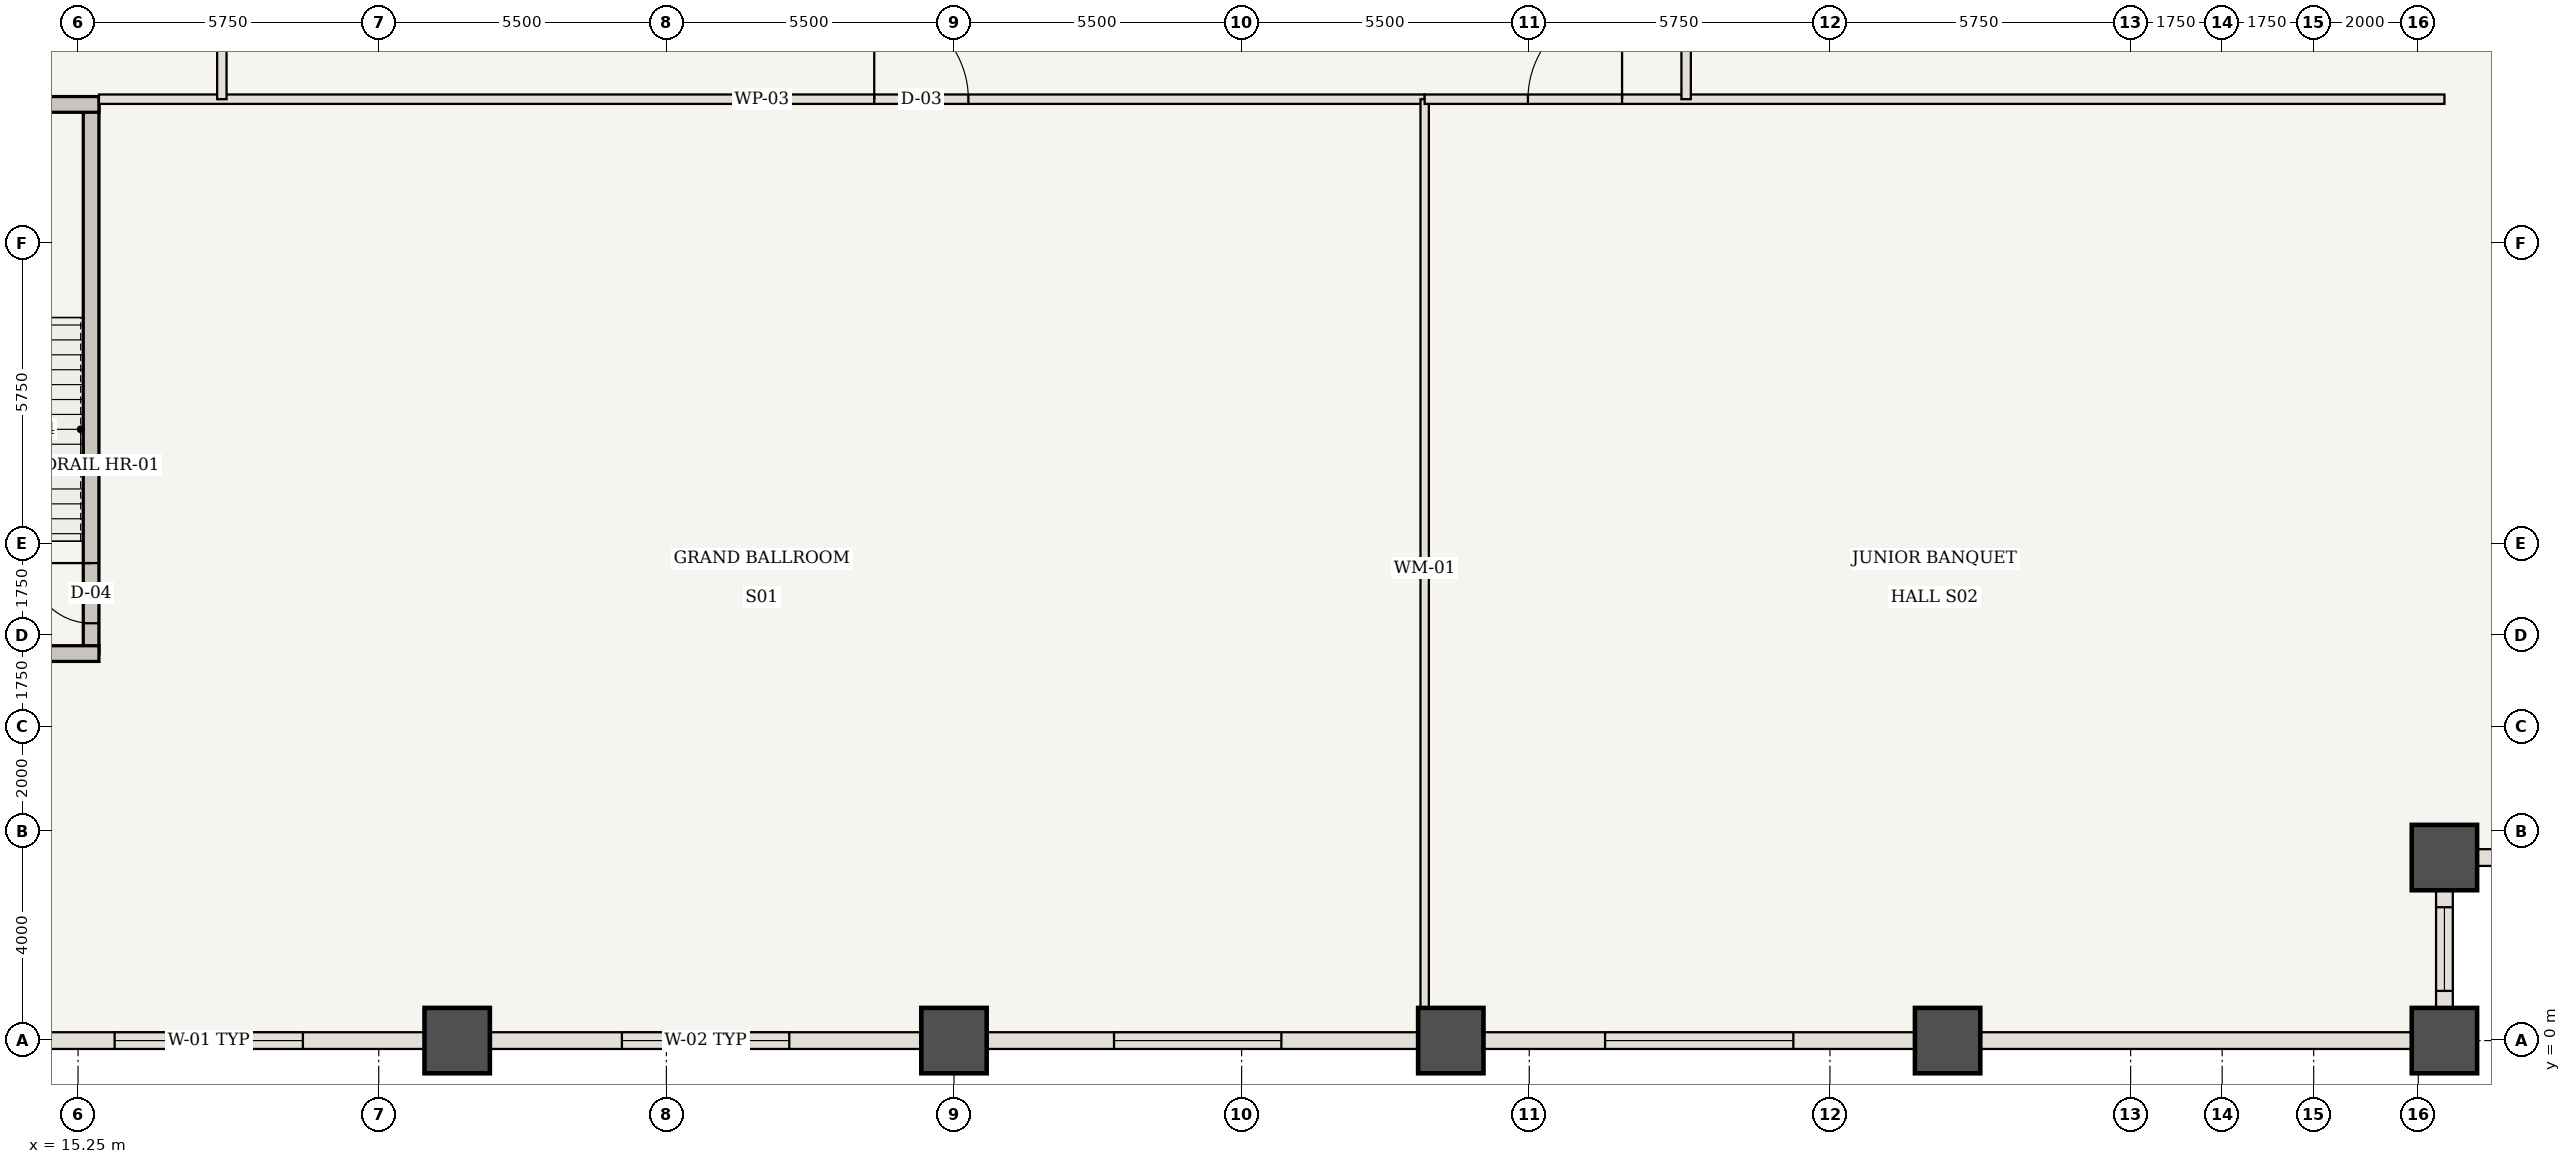
"""IFC4 building model, lengths in metres.
Left out: names, types, materials, properties, quantities, classifications, styles, units other than length and angle.
Written with IfcOpenShell. Run it as: python <this file> out.ifc"""

import sys

from ifc_helpers import new_model, si_unit, direction, frame, frame_2d, origin, origin_2d, place, context, subcontext, project, spatial, rectangle, extrude, element, fill, save


model = new_model("IFC4")
c1 = context("Model", 3, precision=1e-05, world=origin(), true_north=direction((0.0, 1.0)))
c2 = subcontext(c1, "Body", "Model", "MODEL_VIEW")
j1 = project(units=[si_unit("LENGTHUNIT", "METRE"), si_unit("PLANEANGLEUNIT", "RADIAN")], contexts=[c1])
p1 = place(None, origin())
s1 = spatial("IfcSite", under=j1, at=p1, CompositionType="ELEMENT")
p2 = place(p1, origin())
s2 = spatial("IfcBuilding", under=s1, at=p2, CompositionType="ELEMENT")
p3 = place(p2, frame((0.0, 0.0, 23.8)))
s3 = spatial("IfcBuildingStorey", under=s2, at=p3, CompositionType="ELEMENT", Elevation=23.8)
for number, where, z_axis, x_axis in (
    (1, (60.5, 0.0, 0.0), (0.0, 0.0, 1.0), (1.0, 0.0, 0.0)),
    (2, (60.5, 3.5, 0.0), (0.0, 0.0, 1.0), (1.0, 0.0, 0.0)),
    (3, (22.5, 0.0, 0.0), (0.0, 0.0, 1.0), (1.0, 0.0, 0.0)),
    (4, (32.0, 0.0, 0.0), (0.0, 0.0, 1.0), (1.0, 0.0, 0.0)),
    (5, (41.5, 0.0, 0.0), (0.0, 0.0, 1.0), (1.0, 0.0, 0.0)),
    (6, (51.0, 0.0, 0.0), (0.0, 0.0, 1.0), (1.0, 0.0, 0.0)),
):
    element("IfcColumn", number, at=place(p3, frame(where, z_axis=z_axis, x_axis=x_axis)), inside=s3, PredefinedType="COLUMN", context=c2, shape_type="SweptSolid", body=[
        extrude(rectangle(XDim=1.25, YDim=1.25, at=origin_2d()), origin(), (0.0, 0.0, 1.0), 5.6),
    ])
p4 = place(p3, frame((15.5, 7.4, 0.0), z_axis=(0.0, 0.0, 1.0), x_axis=(0.0, 1.0, 0.0)))
e7 = element("IfcWall", 7, at=p4, inside=s3, PredefinedType="SHEAR", context=c2, shape_type="SweptSolid", body=[
    extrude(rectangle(XDim=10.5, YDim=0.3, at=frame_2d((5.25, 0.0))), origin(), (0.0, 0.0, 1.0), 5.18),
])
p5 = place(p4, frame((0.58, 0.0, 0.0)))
e8 = element("IfcOpeningElement", 8, at=p5, cuts=e7, PredefinedType="OPENING", context=c2, shape_type="SweptSolid", body=[
    extrude(rectangle(XDim=1.15, YDim=2.15, at=frame_2d((0.575, 1.075))), frame((0.0, 0.16, 0.0), z_axis=(0.0, -1.0, 0.0), x_axis=(1.0, 0.0, 0.0)), (0.0, 0.0, 1.0), 0.32),
])
for number, where, z_axis, x_axis in (
    (9, (10.9, 7.4, 0.0), (0.0, 0.0, 1.0), (1.0, 0.0, 0.0)),
    (10, (10.9, 17.9, 0.0), (0.0, 0.0, 1.0), (1.0, 0.0, 0.0)),
):
    element("IfcWall", number, at=place(p3, frame(where, z_axis=z_axis, x_axis=x_axis)), inside=s3, PredefinedType="SHEAR", context=c2, shape_type="SweptSolid", body=[
        extrude(rectangle(XDim=4.75, YDim=0.3, at=frame_2d((2.375, 0.0))), origin(), (0.0, 0.0, 1.0), 5.18),
    ])
p6 = place(p3, frame((15.65, 18.0, 0.0), z_axis=(0.0, 0.0, 1.0), x_axis=(1.0, 0.0, 0.0)))
e11 = element("IfcWall", 11, at=p6, inside=s3, PredefinedType="STANDARD", context=c2, shape_type="SweptSolid", body=[
    extrude(rectangle(XDim=25.35, YDim=0.18, at=frame_2d((12.675, 0.0))), origin(), (0.0, 0.0, 1.0), 5.18),
])
p7 = place(p6, frame((14.825, 0.0, 0.0)))
e12 = element("IfcOpeningElement", 12, at=p7, cuts=e11, PredefinedType="OPENING", context=c2, shape_type="SweptSolid", body=[
    extrude(rectangle(XDim=1.8, YDim=2.35, at=frame_2d((0.9, 1.175))), frame((0.0, 0.1, 0.0), z_axis=(0.0, -1.0, 0.0), x_axis=(1.0, 0.0, 0.0)), (0.0, 0.0, 1.0), 0.2),
])
p8 = place(p3, frame((41.0, 0.06, 0.0), z_axis=(0.0, 0.0, 1.0), x_axis=(0.0, 1.0, 0.0)))
e13 = element("IfcWall", 13, at=p8, inside=s3, PredefinedType="MOVABLE", context=c2, shape_type="SweptSolid", body=[
    extrude(rectangle(XDim=17.94, YDim=0.16, at=frame_2d((8.97, 0.0))), origin(), (0.0, 0.0, 1.0), 5.18),
])
p9 = place(p3, frame((41.0, 18.0, 0.0), z_axis=(0.0, 0.0, 1.0), x_axis=(1.0, 0.0, 0.0)))
e14 = element("IfcWall", 14, at=p9, inside=s3, PredefinedType="STANDARD", context=c2, shape_type="SweptSolid", body=[
    extrude(rectangle(XDim=19.5, YDim=0.18, at=frame_2d((9.75, 0.0))), origin(), (0.0, 0.0, 1.0), 5.18),
])
p10 = place(p9, frame((1.975, 0.0, 0.0)))
e15 = element("IfcOpeningElement", 15, at=p10, cuts=e14, PredefinedType="OPENING", context=c2, shape_type="SweptSolid", body=[
    extrude(rectangle(XDim=1.8, YDim=2.35, at=frame_2d((0.9, 1.175))), frame((0.0, 0.1, 0.0), z_axis=(0.0, -1.0, 0.0), x_axis=(1.0, 0.0, 0.0)), (0.0, 0.0, 1.0), 0.2),
])
p11 = place(p3, frame((18.0, 18.0, 0.0), z_axis=(0.0, 0.0, 1.0), x_axis=(0.0, 1.0, 0.0)))
e16 = element("IfcWall", 16, at=p11, inside=s3, PredefinedType="STANDARD", context=c2, shape_type="SweptSolid", body=[
    extrude(rectangle(XDim=13.2, YDim=0.18, at=frame_2d((6.6, 0.0))), origin(), (0.0, 0.0, 1.0), 5.18),
])
p12 = place(p11, frame((6.1, 0.0, 0.0)))
e17 = element("IfcOpeningElement", 17, at=p12, cuts=e16, PredefinedType="OPENING", context=c2, shape_type="SweptSolid", body=[
    extrude(rectangle(XDim=0.95, YDim=2.15, at=frame_2d((0.475, 1.075))), frame((0.0, 0.1, 0.0), z_axis=(0.0, -1.0, 0.0), x_axis=(1.0, 0.0, 0.0)), (0.0, 0.0, 1.0), 0.2),
])
p13 = place(p3, frame((46.0, 18.0, 0.0), z_axis=(0.0, 0.0, 1.0), x_axis=(0.0, 1.0, 0.0)))
e18 = element("IfcWall", 18, at=p13, inside=s3, PredefinedType="STANDARD", context=c2, shape_type="SweptSolid", body=[
    extrude(rectangle(XDim=14.8, YDim=0.18, at=frame_2d((7.4, 0.0))), origin(), (0.0, 0.0, 1.0), 5.18),
])
p14 = place(p13, frame((6.9, 0.0, 0.0)))
e19 = element("IfcOpeningElement", 19, at=p14, cuts=e18, PredefinedType="OPENING", context=c2, shape_type="SweptSolid", body=[
    extrude(rectangle(XDim=0.95, YDim=2.15, at=frame_2d((0.475, 1.075))), frame((0.0, 0.1, 0.0), z_axis=(0.0, -1.0, 0.0), x_axis=(1.0, 0.0, 0.0)), (0.0, 0.0, 1.0), 0.2),
])
p15 = place(p3, frame((22.5, 0.0, 0.0), z_axis=(0.0, 0.0, 1.0), x_axis=(-1.0, 0.0, 0.0)))
e20 = element("IfcWall", 20, at=p15, inside=s3, PredefinedType="USERDEFINED", context=c2, shape_type="SweptSolid", body=[
    extrude(rectangle(XDim=9.5, YDim=0.32, at=frame_2d((4.75, 0.0))), origin(), (0.0, 0.0, 1.0), 4.28),
])
p16 = place(p15, frame((2.95, 0.0, 0.85)))
e21 = element("IfcOpeningElement", 21, at=p16, cuts=e20, PredefinedType="OPENING", context=c2, shape_type="SweptSolid", body=[
    extrude(rectangle(XDim=3.6, YDim=2.6, at=frame_2d((1.8, 1.3))), frame((0.0, 0.17, 0.0), z_axis=(0.0, -1.0, 0.0), x_axis=(1.0, 0.0, 0.0)), (0.0, 0.0, 1.0), 0.34),
])
p17 = place(p3, frame((32.0, 0.0, 0.0), z_axis=(0.0, 0.0, 1.0), x_axis=(-1.0, 0.0, 0.0)))
e22 = element("IfcWall", 22, at=p17, inside=s3, PredefinedType="USERDEFINED", context=c2, shape_type="SweptSolid", body=[
    extrude(rectangle(XDim=9.5, YDim=0.32, at=frame_2d((4.75, 0.0))), origin(), (0.0, 0.0, 1.0), 4.28),
])
p18 = place(p17, frame((3.15, 0.0, 0.85)))
e23 = element("IfcOpeningElement", 23, at=p18, cuts=e22, PredefinedType="OPENING", context=c2, shape_type="SweptSolid", body=[
    extrude(rectangle(XDim=3.2, YDim=2.4, at=frame_2d((1.6, 1.2))), frame((0.0, 0.17, 0.0), z_axis=(0.0, -1.0, 0.0), x_axis=(1.0, 0.0, 0.0)), (0.0, 0.0, 1.0), 0.34),
])
p19 = place(p3, frame((41.5, 0.0, 0.0), z_axis=(0.0, 0.0, 1.0), x_axis=(-1.0, 0.0, 0.0)))
e24 = element("IfcWall", 24, at=p19, inside=s3, PredefinedType="USERDEFINED", context=c2, shape_type="SweptSolid", body=[
    extrude(rectangle(XDim=9.5, YDim=0.32, at=frame_2d((4.75, 0.0))), origin(), (0.0, 0.0, 1.0), 4.28),
])
p20 = place(p19, frame((3.24, 0.0, 0.85)))
e25 = element("IfcOpeningElement", 25, at=p20, cuts=e24, PredefinedType="OPENING", context=c2, shape_type="SweptSolid", body=[
    extrude(rectangle(XDim=3.2, YDim=2.4, at=frame_2d((1.6, 1.2))), frame((0.0, 0.17, 0.0), z_axis=(0.0, -1.0, 0.0), x_axis=(1.0, 0.0, 0.0)), (0.0, 0.0, 1.0), 0.34),
])
p21 = place(p3, frame((51.0, 0.0, 0.0), z_axis=(0.0, 0.0, 1.0), x_axis=(-1.0, 0.0, 0.0)))
e26 = element("IfcWall", 26, at=p21, inside=s3, PredefinedType="USERDEFINED", context=c2, shape_type="SweptSolid", body=[
    extrude(rectangle(XDim=9.5, YDim=0.32, at=frame_2d((4.75, 0.0))), origin(), (0.0, 0.0, 1.0), 4.28),
])
p22 = place(p21, frame((2.95, 0.0, 0.85)))
e27 = element("IfcOpeningElement", 27, at=p22, cuts=e26, PredefinedType="OPENING", context=c2, shape_type="SweptSolid", body=[
    extrude(rectangle(XDim=3.6, YDim=2.6, at=frame_2d((1.8, 1.3))), frame((0.0, 0.17, 0.0), z_axis=(0.0, -1.0, 0.0), x_axis=(1.0, 0.0, 0.0)), (0.0, 0.0, 1.0), 0.34),
])
p23 = place(p3, frame((60.5, 0.0, 0.0), z_axis=(0.0, 0.0, 1.0), x_axis=(-1.0, 0.0, 0.0)))
e28 = element("IfcWall", 28, at=p23, inside=s3, PredefinedType="USERDEFINED", context=c2, shape_type="SweptSolid", body=[
    extrude(rectangle(XDim=9.5, YDim=0.32, at=frame_2d((4.75, 0.0))), origin(), (0.0, 0.0, 1.0), 4.28),
])
p24 = place(p3, frame((60.5, 3.5, 0.0), z_axis=(0.0, 0.0, 1.0), x_axis=(0.0, -1.0, 0.0)))
e29 = element("IfcWall", 29, at=p24, inside=s3, PredefinedType="USERDEFINED", context=c2, shape_type="SweptSolid", body=[
    extrude(rectangle(XDim=3.5, YDim=0.32, at=frame_2d((1.75, 0.0))), origin(), (0.0, 0.0, 1.0), 4.28),
])
p25 = place(p24, frame((0.95, 0.0, 0.85)))
e30 = element("IfcOpeningElement", 30, at=p25, cuts=e29, PredefinedType="OPENING", context=c2, shape_type="SweptSolid", body=[
    extrude(rectangle(XDim=1.6, YDim=2.05, at=frame_2d((0.8, 1.025))), frame((0.0, 0.17, 0.0), z_axis=(0.0, -1.0, 0.0), x_axis=(1.0, 0.0, 0.0)), (0.0, 0.0, 1.0), 0.34),
])
p26 = place(p3, frame((64.0, 3.5, 0.0), z_axis=(0.0, 0.0, 1.0), x_axis=(-1.0, 0.0, 0.0)))
e31 = element("IfcWall", 31, at=p26, inside=s3, PredefinedType="USERDEFINED", context=c2, shape_type="SweptSolid", body=[
    extrude(rectangle(XDim=3.5, YDim=0.32, at=frame_2d((1.75, 0.0))), origin(), (0.0, 0.0, 1.0), 4.28),
])
p27 = place(p26, frame((0.95, 0.0, 0.85)))
e32 = element("IfcOpeningElement", 32, at=p27, cuts=e31, PredefinedType="OPENING", context=c2, shape_type="SweptSolid", body=[
    extrude(rectangle(XDim=1.6, YDim=2.05, at=frame_2d((0.8, 1.025))), frame((0.0, 0.17, 0.0), z_axis=(0.0, -1.0, 0.0), x_axis=(1.0, 0.0, 0.0)), (0.0, 0.0, 1.0), 0.34),
])
p28 = place(p5, origin())
e33 = element("IfcDoor", 33, at=p28, inside=s3, OperationType="SINGLE_SWING_RIGHT", PredefinedType="DOOR", context=c2, shape_type="SweptSolid", body=[
    extrude(rectangle(XDim=1.15, YDim=2.15, at=frame_2d((0.575, 1.075))), frame((0.0, 0.025, 0.0), z_axis=(0.0, -1.0, 0.0), x_axis=(1.0, 0.0, 0.0)), (0.0, 0.0, 1.0), 0.05),
])
fill(e8, e33)
p29 = place(p7, origin())
e34 = element("IfcDoor", 34, at=p29, inside=s3, OperationType="SINGLE_SWING_LEFT", PredefinedType="DOOR", context=c2, shape_type="SweptSolid", body=[
    extrude(rectangle(XDim=1.8, YDim=2.35, at=frame_2d((0.9, 1.175))), frame((0.0, 0.025, 0.0), z_axis=(0.0, -1.0, 0.0), x_axis=(1.0, 0.0, 0.0)), (0.0, 0.0, 1.0), 0.05),
])
fill(e12, e34)
p30 = place(p10, origin())
e35 = element("IfcDoor", 35, at=p30, inside=s3, OperationType="SINGLE_SWING_RIGHT", PredefinedType="DOOR", context=c2, shape_type="SweptSolid", body=[
    extrude(rectangle(XDim=1.8, YDim=2.35, at=frame_2d((0.9, 1.175))), frame((0.0, 0.025, 0.0), z_axis=(0.0, -1.0, 0.0), x_axis=(1.0, 0.0, 0.0)), (0.0, 0.0, 1.0), 0.05),
])
fill(e15, e35)
p31 = place(p16, origin())
e36 = element("IfcWindow", 36, at=p31, inside=s3, PartitioningType="SINGLE_PANEL", PredefinedType="WINDOW", context=c2, shape_type="SweptSolid", body=[
    extrude(rectangle(XDim=3.6, YDim=2.6, at=frame_2d((1.8, 1.3))), frame((0.0, 0.03, 0.0), z_axis=(0.0, -1.0, 0.0), x_axis=(1.0, 0.0, 0.0)), (0.0, 0.0, 1.0), 0.06),
])
fill(e21, e36)
p32 = place(p18, origin())
e37 = element("IfcWindow", 37, at=p32, inside=s3, PartitioningType="SINGLE_PANEL", PredefinedType="WINDOW", context=c2, shape_type="SweptSolid", body=[
    extrude(rectangle(XDim=3.2, YDim=2.4, at=frame_2d((1.6, 1.2))), frame((0.0, 0.03, 0.0), z_axis=(0.0, -1.0, 0.0), x_axis=(1.0, 0.0, 0.0)), (0.0, 0.0, 1.0), 0.06),
])
fill(e23, e37)
p33 = place(p20, origin())
e38 = element("IfcWindow", 38, at=p33, inside=s3, PartitioningType="SINGLE_PANEL", PredefinedType="WINDOW", context=c2, shape_type="SweptSolid", body=[
    extrude(rectangle(XDim=3.2, YDim=2.4, at=frame_2d((1.6, 1.2))), frame((0.0, 0.03, 0.0), z_axis=(0.0, -1.0, 0.0), x_axis=(1.0, 0.0, 0.0)), (0.0, 0.0, 1.0), 0.06),
])
fill(e25, e38)
p34 = place(p22, origin())
e39 = element("IfcWindow", 39, at=p34, inside=s3, PartitioningType="SINGLE_PANEL", PredefinedType="WINDOW", context=c2, shape_type="SweptSolid", body=[
    extrude(rectangle(XDim=3.6, YDim=2.6, at=frame_2d((1.8, 1.3))), frame((0.0, 0.03, 0.0), z_axis=(0.0, -1.0, 0.0), x_axis=(1.0, 0.0, 0.0)), (0.0, 0.0, 1.0), 0.06),
])
fill(e27, e39)
p35 = place(p25, origin())
e40 = element("IfcWindow", 40, at=p35, inside=s3, PartitioningType="SINGLE_PANEL", PredefinedType="WINDOW", context=c2, shape_type="SweptSolid", body=[
    extrude(rectangle(XDim=1.6, YDim=2.05, at=frame_2d((0.8, 1.025))), frame((0.0, 0.03, 0.0), z_axis=(0.0, -1.0, 0.0), x_axis=(1.0, 0.0, 0.0)), (0.0, 0.0, 1.0), 0.06),
])
fill(e30, e40)
save(model, sys.argv[1])
